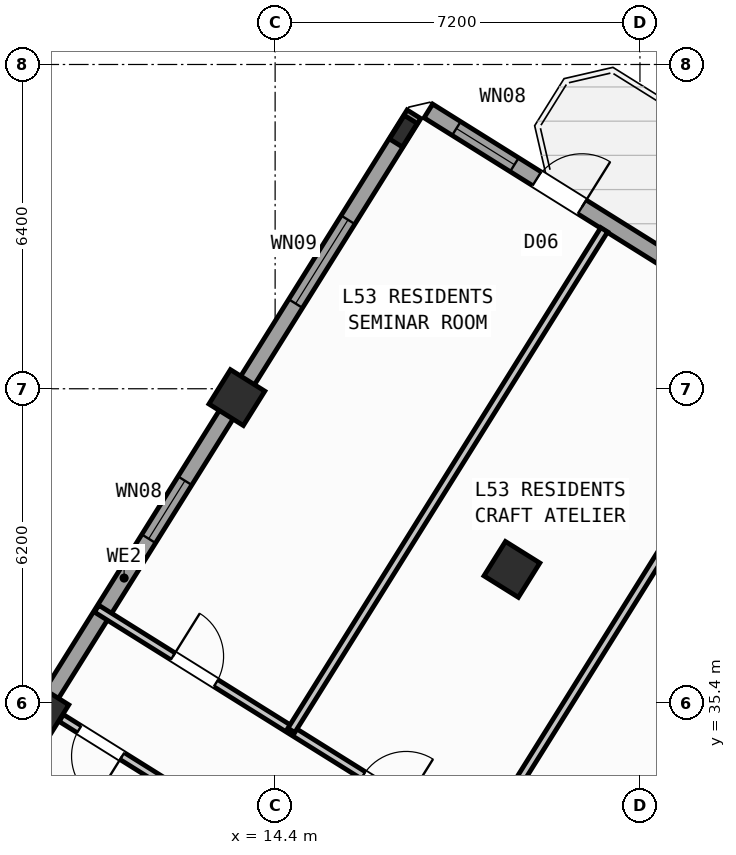
"""IFC4 building model, lengths in metres.
Left out: names, types, materials, properties, quantities, classifications, styles, units other than length and angle.
Written with IfcOpenShell. Run it as: python <this file> out.ifc"""

import sys

from ifc_helpers import new_model, si_unit, direction, frame, frame_2d, origin, origin_2d, place, context, subcontext, project, spatial, rectangle, hollow_rectangle, i_section, extrude, source, transform, mapped, element, fill, save


model = new_model("IFC4")
c1 = context("Model", 3, precision=1e-05, world=origin(), true_north=direction((0.0, 1.0)))
c2 = subcontext(c1, "Body", "Model", "MODEL_VIEW")
j1 = project(units=[si_unit("LENGTHUNIT", "METRE"), si_unit("PLANEANGLEUNIT", "RADIAN")], contexts=[c1])
p1 = place(None, origin())
s1 = spatial("IfcSite", under=j1, at=p1, CompositionType="ELEMENT")
p2 = place(p1, origin())
s2 = spatial("IfcBuilding", under=s1, at=p2, CompositionType="ELEMENT")
p3 = place(p2, frame((0.0, 0.0, 211.2)))
s3 = spatial("IfcBuildingStorey", under=s2, at=p3, CompositionType="ELEMENT", Elevation=211.2)
m1 = source(origin(), c2, "Body", "SweptSolid", [
    extrude(hollow_rectangle(XDim=0.8, YDim=0.8, WallThickness=0.032, at=origin_2d()), origin(), (0.0, 0.0, 1.0), 3.6),
])
p4 = place(p3, frame((19.073, 38.034, 0.0), z_axis=(0.0, 0.0, 1.0), x_axis=(-0.848048096156, 0.529919264233, 0.0)))
e1 = element("IfcColumn", 1, at=p4, inside=s3, PredefinedType="COLUMN", context=c2, shape_type="MappedRepresentation", body=[
    mapped(m1, transform((0.0, 0.0, 0.0), scale=1.0)),
])
m2 = source(origin(), c2, "Body", "SweptSolid", [
    extrude(i_section(OverallWidth=0.3, OverallDepth=0.55, WebThickness=0.015, FlangeThickness=0.029, at=origin_2d()), origin(), (0.0, 0.0, 1.0), 3.6),
])
p5 = place(p3, frame((16.931, 46.684, 0.0), z_axis=(0.0, 0.0, 1.0), x_axis=(-0.848048096156, 0.529919264233, 0.0)))
e2 = element("IfcColumn", 2, at=p5, inside=s3, PredefinedType="COLUMN", context=c2, shape_type="MappedRepresentation", body=[
    mapped(m2, transform((0.0, 0.0, 0.0), scale=1.0)),
])
for number, where, z_axis, x_axis in (
    (3, (13.646, 41.426, 0.0), (0.0, 0.0, 1.0), (-0.848, 0.53, 0.0)),
    (4, (9.777, 35.235, 0.0), (0.0, 0.0, 1.0), (-0.848, 0.53, 0.0)),
):
    element("IfcColumn", number, at=place(p3, frame(where, z_axis=z_axis, x_axis=x_axis)), inside=s3, PredefinedType="COLUMN", context=c2, shape_type="MappedRepresentation", body=[
        mapped(m1, transform((0.0, 0.0, 0.0), scale=1.0)),
    ])
p6 = place(p3, frame((5.7, 28.71, 0.0), z_axis=(0.0, 0.0, 1.0), x_axis=(0.529923711467, 0.8480453172, 0.0)))
e5 = element("IfcWall", 5, at=p6, inside=s3, PredefinedType="STANDARD", context=c2, shape_type="SweptSolid", body=[
    extrude(rectangle(XDim=21.587, YDim=0.32, at=frame_2d((10.794, 0.0))), origin(), (0.0, 0.0, 1.0), 2.825),
])
p7 = place(p6, frame((2.184, 0.0, 0.9)))
e6 = element("IfcOpeningElement", 6, at=p7, cuts=e5, PredefinedType="OPENING", context=c2, shape_type="SweptSolid", body=[
    extrude(rectangle(XDim=1.65, YDim=1.45, at=frame_2d((0.825, 0.725))), frame((0.0, 0.17, 0.0), z_axis=(0.0, -1.0, 0.0), x_axis=(1.0, 0.0, 0.0)), (0.0, 0.0, 1.0), 0.34),
])
p8 = place(p6, frame((11.709, 0.0, 0.9)))
e7 = element("IfcOpeningElement", 7, at=p8, cuts=e5, PredefinedType="OPENING", context=c2, shape_type="SweptSolid", body=[
    extrude(rectangle(XDim=1.35, YDim=1.45, at=frame_2d((0.675, 0.725))), frame((0.0, 0.17, 0.0), z_axis=(0.0, -1.0, 0.0), x_axis=(1.0, 0.0, 0.0)), (0.0, 0.0, 1.0), 0.34),
])
p9 = place(p6, frame((17.181, 0.0, 0.95)))
e8 = element("IfcOpeningElement", 8, at=p9, cuts=e5, PredefinedType="OPENING", context=c2, shape_type="SweptSolid", body=[
    extrude(rectangle(XDim=1.95, YDim=1.35, at=frame_2d((0.975, 0.675))), frame((0.0, 0.17, 0.0), z_axis=(0.0, -1.0, 0.0), x_axis=(1.0, 0.0, 0.0)), (0.0, 0.0, 1.0), 0.34),
])
p10 = place(p3, frame((17.424, 47.083, 0.0), z_axis=(0.0, 0.0, 1.0), x_axis=(0.848049927979, -0.529916332693, 0.0)))
e9 = element("IfcWall", 9, at=p10, inside=s3, PredefinedType="STANDARD", context=c2, shape_type="SweptSolid", body=[
    extrude(rectangle(XDim=29.223, YDim=0.32, at=frame_2d((14.612, 0.0))), origin(), (0.0, 0.0, 1.0), 3.35),
])
p11 = place(p10, frame((2.526, 0.0, 0.0)))
e10 = element("IfcOpeningElement", 10, at=p11, cuts=e9, PredefinedType="OPENING", context=c2, shape_type="SweptSolid", body=[
    extrude(rectangle(XDim=1.05, YDim=2.15, at=frame_2d((0.525, 1.075))), frame((0.0, 0.17, 0.0), z_axis=(0.0, -1.0, 0.0), x_axis=(1.0, 0.0, 0.0)), (0.0, 0.0, 1.0), 0.34),
])
p12 = place(p10, frame((0.653, 0.0, 0.9)))
e11 = element("IfcOpeningElement", 11, at=p12, cuts=e9, PredefinedType="OPENING", context=c2, shape_type="SweptSolid", body=[
    extrude(rectangle(XDim=1.35, YDim=1.45, at=frame_2d((0.675, 0.725))), frame((0.0, 0.17, 0.0), z_axis=(0.0, -1.0, 0.0), x_axis=(1.0, 0.0, 0.0)), (0.0, 0.0, 1.0), 0.34),
])
p13 = place(p10, frame((6.897, 0.0, 1.0)))
e12 = element("IfcOpeningElement", 12, at=p13, cuts=e9, PredefinedType="OPENING", context=c2, shape_type="SweptSolid", body=[
    extrude(rectangle(XDim=0.9, YDim=1.25, at=frame_2d((0.45, 0.625))), frame((0.0, 0.17, 0.0), z_axis=(0.0, -1.0, 0.0), x_axis=(1.0, 0.0, 0.0)), (0.0, 0.0, 1.0), 0.34),
])
p14 = place(p10, frame((9.602, 0.0, 0.95)))
e13 = element("IfcOpeningElement", 13, at=p14, cuts=e9, PredefinedType="OPENING", context=c2, shape_type="SweptSolid", body=[
    extrude(rectangle(XDim=1.95, YDim=1.35, at=frame_2d((0.975, 0.675))), frame((0.0, 0.17, 0.0), z_axis=(0.0, -1.0, 0.0), x_axis=(1.0, 0.0, 0.0)), (0.0, 0.0, 1.0), 0.34),
])
p15 = place(p10, frame((14.096, 0.0, 1.0)))
e14 = element("IfcOpeningElement", 14, at=p15, cuts=e9, PredefinedType="OPENING", context=c2, shape_type="SweptSolid", body=[
    extrude(rectangle(XDim=0.9, YDim=1.25, at=frame_2d((0.45, 0.625))), frame((0.0, 0.17, 0.0), z_axis=(0.0, -1.0, 0.0), x_axis=(1.0, 0.0, 0.0)), (0.0, 0.0, 1.0), 0.34),
])
p16 = place(p10, frame((17.254, 0.0, 1.0)))
e15 = element("IfcOpeningElement", 15, at=p16, cuts=e9, PredefinedType="OPENING", context=c2, shape_type="SweptSolid", body=[
    extrude(rectangle(XDim=0.9, YDim=1.25, at=frame_2d((0.45, 0.625))), frame((0.0, 0.17, 0.0), z_axis=(0.0, -1.0, 0.0), x_axis=(1.0, 0.0, 0.0)), (0.0, 0.0, 1.0), 0.34),
])
p17 = place(p10, frame((21.139, 0.0, 0.9)))
e16 = element("IfcOpeningElement", 16, at=p17, cuts=e9, PredefinedType="OPENING", context=c2, shape_type="SweptSolid", body=[
    extrude(rectangle(XDim=1.35, YDim=1.45, at=frame_2d((0.675, 0.725))), frame((0.0, 0.17, 0.0), z_axis=(0.0, -1.0, 0.0), x_axis=(1.0, 0.0, 0.0)), (0.0, 0.0, 1.0), 0.34),
])
p18 = place(p10, frame((25.778, 0.0, 0.9)))
e17 = element("IfcOpeningElement", 17, at=p18, cuts=e9, PredefinedType="OPENING", context=c2, shape_type="SweptSolid", body=[
    extrude(rectangle(XDim=1.35, YDim=1.45, at=frame_2d((0.675, 0.725))), frame((0.0, 0.17, 0.0), z_axis=(0.0, -1.0, 0.0), x_axis=(1.0, 0.0, 0.0)), (0.0, 0.0, 1.0), 0.34),
])
p19 = place(p3, frame((25.065, 28.394, 0.0), z_axis=(0.0, 0.0, 1.0), x_axis=(-0.848048310262, 0.529918921593, 0.0)))
e18 = element("IfcWall", 18, at=p19, inside=s3, PredefinedType="PARTITIONING", context=c2, shape_type="SweptSolid", body=[
    extrude(rectangle(XDim=16.73, YDim=0.16, at=frame_2d((8.365, 0.0))), origin(), (0.0, 0.0, 1.0), 3.34),
])
p20 = place(p19, frame((1.338, 0.0, 0.0)))
e19 = element("IfcOpeningElement", 19, at=p20, cuts=e18, PredefinedType="OPENING", context=c2, shape_type="SweptSolid", body=[
    extrude(rectangle(XDim=1.0, YDim=2.1, at=frame_2d((0.5, 1.05))), frame((0.0, 0.09, 0.0), z_axis=(0.0, -1.0, 0.0), x_axis=(1.0, 0.0, 0.0)), (0.0, 0.0, 1.0), 0.18),
])
p21 = place(p19, frame((5.265, 0.0, 0.0)))
e20 = element("IfcOpeningElement", 20, at=p21, cuts=e18, PredefinedType="OPENING", context=c2, shape_type="SweptSolid", body=[
    extrude(rectangle(XDim=1.0, YDim=2.1, at=frame_2d((0.5, 1.05))), frame((0.0, 0.09, 0.0), z_axis=(0.0, -1.0, 0.0), x_axis=(1.0, 0.0, 0.0)), (0.0, 0.0, 1.0), 0.18),
])
p22 = place(p19, frame((9.526, 0.0, 0.0)))
e21 = element("IfcOpeningElement", 21, at=p22, cuts=e18, PredefinedType="OPENING", context=c2, shape_type="SweptSolid", body=[
    extrude(rectangle(XDim=1.0, YDim=2.1, at=frame_2d((0.5, 1.05))), frame((0.0, 0.09, 0.0), z_axis=(0.0, -1.0, 0.0), x_axis=(1.0, 0.0, 0.0)), (0.0, 0.0, 1.0), 0.18),
])
p23 = place(p19, frame((13.954, 0.0, 0.0)))
e22 = element("IfcOpeningElement", 22, at=p23, cuts=e18, PredefinedType="OPENING", context=c2, shape_type="SweptSolid", body=[
    extrude(rectangle(XDim=1.0, YDim=2.1, at=frame_2d((0.5, 1.05))), frame((0.0, 0.09, 0.0), z_axis=(0.0, -1.0, 0.0), x_axis=(1.0, 0.0, 0.0)), (0.0, 0.0, 1.0), 0.18),
])
p24 = place(p3, frame((14.908, 32.147, 0.0), z_axis=(0.0, 0.0, 1.0), x_axis=(-0.848049955116, 0.529916289265, 0.0)))
e23 = element("IfcWall", 23, at=p24, inside=s3, PredefinedType="PARTITIONING", context=c2, shape_type="SweptSolid", body=[
    extrude(rectangle(XDim=5.576, YDim=0.16, at=frame_2d((2.788, 0.0))), origin(), (0.0, 0.0, 1.0), 2.825),
])
p25 = place(p24, frame((4.158, 0.0, 0.0)))
e24 = element("IfcOpeningElement", 24, at=p25, cuts=e23, PredefinedType="OPENING", context=c2, shape_type="SweptSolid", body=[
    extrude(rectangle(XDim=1.0, YDim=2.1, at=frame_2d((0.5, 1.05))), frame((0.0, 0.09, 0.0), z_axis=(0.0, -1.0, 0.0), x_axis=(1.0, 0.0, 0.0)), (0.0, 0.0, 1.0), 0.18),
])
p26 = place(p3, frame((24.379, 34.233, 0.0), z_axis=(0.0, 0.0, 1.0), x_axis=(-0.529922402838, -0.84804613493, 0.0)))
e25 = element("IfcWall", 25, at=p26, inside=s3, PredefinedType="PARTITIONING", context=c2, shape_type="SweptSolid", body=[
    extrude(rectangle(XDim=4.588, YDim=0.16, at=frame_2d((2.294, 0.0))), origin(), (0.0, 0.0, 1.0), 2.825),
])
for number, where, z_axis, x_axis in (
    (26, (24.578, 42.436, 0.0), (0.0, 0.0, 1.0), (-0.53, -0.848, 0.0)),
    (27, (20.894, 44.738, 0.0), (0.0, 0.0, 1.0), (-0.53, -0.848, 0.0)),
):
    element("IfcWall", number, at=place(p3, frame(where, z_axis=z_axis, x_axis=x_axis)), inside=s3, PredefinedType="PARTITIONING", context=c2, shape_type="SweptSolid", body=[
        extrude(rectangle(XDim=11.65, YDim=0.16, at=frame_2d((5.825, 0.0))), origin(), (0.0, 0.0, 1.0), 2.995),
    ])
m3 = source(origin(), c2, "Body", "SweptSolid", [
    extrude(rectangle(XDim=1.05, YDim=2.15, at=frame_2d((0.525, 1.075))), frame((0.0, 0.025, 0.0), z_axis=(0.0, -1.0, 0.0), x_axis=(1.0, 0.0, 0.0)), (0.0, 0.0, 1.0), 0.05),
])
p27 = place(p11, origin())
e28 = element("IfcDoor", 28, at=p27, inside=s3, OperationType="SINGLE_SWING_RIGHT", PredefinedType="DOOR", context=c2, shape_type="MappedRepresentation", body=[
    mapped(m3, transform((0.0, 0.0, 0.0), scale=1.0)),
])
fill(e10, e28)
m4 = source(origin(), c2, "Body", "SweptSolid", [
    extrude(rectangle(XDim=1.35, YDim=1.45, at=frame_2d((0.675, 0.725))), frame((0.0, 0.03, 0.0), z_axis=(0.0, -1.0, 0.0), x_axis=(1.0, 0.0, 0.0)), (0.0, 0.0, 1.0), 0.06),
])
p28 = place(p8, origin())
e29 = element("IfcWindow", 29, at=p28, inside=s3, PartitioningType="SINGLE_PANEL", PredefinedType="WINDOW", context=c2, shape_type="MappedRepresentation", body=[
    mapped(m4, transform((0.0, 0.0, 0.0), scale=1.0)),
])
fill(e7, e29)
m5 = source(origin(), c2, "Body", "SweptSolid", [
    extrude(rectangle(XDim=1.95, YDim=1.35, at=frame_2d((0.975, 0.675))), frame((0.0, 0.03, 0.0), z_axis=(0.0, -1.0, 0.0), x_axis=(1.0, 0.0, 0.0)), (0.0, 0.0, 1.0), 0.06),
])
p29 = place(p9, origin())
e30 = element("IfcWindow", 30, at=p29, inside=s3, PartitioningType="SINGLE_PANEL", PredefinedType="WINDOW", context=c2, shape_type="MappedRepresentation", body=[
    mapped(m5, transform((0.0, 0.0, 0.0), scale=1.0)),
])
fill(e8, e30)
p30 = place(p12, origin())
e31 = element("IfcWindow", 31, at=p30, inside=s3, PartitioningType="SINGLE_PANEL", PredefinedType="WINDOW", context=c2, shape_type="MappedRepresentation", body=[
    mapped(m4, transform((0.0, 0.0, 0.0), scale=1.0)),
])
fill(e11, e31)
m6 = source(origin(), c2, "Body", "SweptSolid", [
    extrude(rectangle(XDim=1.0, YDim=2.1, at=frame_2d((0.5, 1.05))), frame((0.0, 0.025, 0.0), z_axis=(0.0, -1.0, 0.0), x_axis=(1.0, 0.0, 0.0)), (0.0, 0.0, 1.0), 0.05),
])
p31 = place(p25, origin())
e32 = element("IfcDoor", 32, at=p31, inside=s3, OperationType="SINGLE_SWING_LEFT", PredefinedType="DOOR", context=c2, shape_type="MappedRepresentation", body=[
    mapped(m6, transform((0.0, 0.0, 0.0), scale=1.0)),
])
fill(e24, e32)
p32 = place(p22, frame((1.0, 0.0, 0.0), z_axis=(0.0, 0.0, 1.0), x_axis=(-1.0, 0.0, 0.0)))
e33 = element("IfcDoor", 33, at=p32, inside=s3, OperationType="SINGLE_SWING_RIGHT", PredefinedType="DOOR", context=c2, shape_type="MappedRepresentation", body=[
    mapped(m6, transform((0.0, 0.0, 0.0), scale=1.0)),
])
fill(e21, e33)
p33 = place(p23, frame((1.0, 0.0, 0.0), z_axis=(0.0, 0.0, 1.0), x_axis=(-1.0, 0.0, 0.0)))
e34 = element("IfcDoor", 34, at=p33, inside=s3, OperationType="SINGLE_SWING_LEFT", PredefinedType="DOOR", context=c2, shape_type="MappedRepresentation", body=[
    mapped(m6, transform((0.0, 0.0, 0.0), scale=1.0)),
])
fill(e22, e34)
save(model, sys.argv[1])
